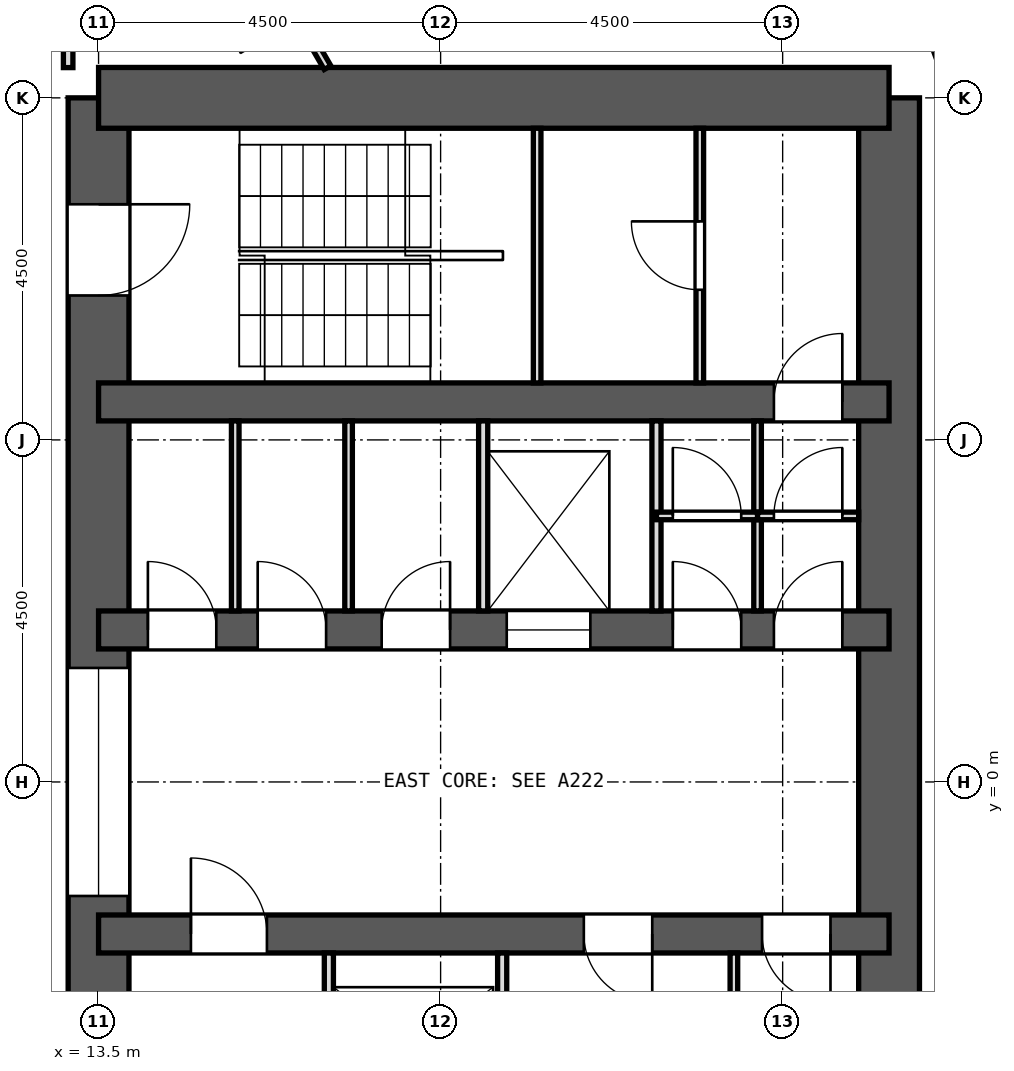
"""IFC4 building model, lengths in metres.
Left out: names, types, materials, properties, quantities, classifications, styles, units other than length and angle.
Written with IfcOpenShell. Run it as: python <this file> out.ifc"""

import sys

from ifc_helpers import new_model, si_unit, direction, frame, frame_2d, origin, place, context, subcontext, project, spatial, rectangle, extrude, element, fill, save


model = new_model("IFC4")
c1 = context("Model", 3, precision=1e-05, world=origin(), true_north=direction((0.0, 1.0)))
c2 = subcontext(c1, "Body", "Model", "MODEL_VIEW")
j1 = project(units=[si_unit("LENGTHUNIT", "METRE"), si_unit("PLANEANGLEUNIT", "RADIAN")], contexts=[c1])
p1 = place(None, origin())
s1 = spatial("IfcSite", under=j1, at=p1, CompositionType="ELEMENT")
p2 = place(p1, origin())
s2 = spatial("IfcBuilding", under=s1, at=p2, CompositionType="ELEMENT")
p3 = place(p2, frame((0.0, 0.0, 141.4)))
s3 = spatial("IfcBuildingStorey", under=s2, at=p3, CompositionType="ELEMENT", Elevation=141.4)
p4 = place(p3, frame((13.5, -9.0, 0.0), z_axis=(0.0, 0.0, 1.0), x_axis=(0.0, 1.0, 0.0)))
e1 = element("IfcWall", 1, at=p4, inside=s3, PredefinedType="SHEAR", context=c2, shape_type="SweptSolid", body=[
    extrude(rectangle(XDim=18.0, YDim=0.8, at=frame_2d((9.0, 0.0))), origin(), (0.0, 0.0, 1.0), 3.3),
])
p5 = place(p4, frame((15.4, 0.0, 0.0)))
e2 = element("IfcOpeningElement", 2, at=p5, cuts=e1, PredefinedType="OPENING", context=c2, shape_type="SweptSolid", body=[
    extrude(rectangle(XDim=1.2, YDim=2.1, at=frame_2d((0.6, 1.05))), frame((0.0, 0.412, 0.0), z_axis=(0.0, -1.0, 0.0), x_axis=(1.0, 0.0, 0.0)), (0.0, 0.0, 1.0), 0.824),
])
p6 = place(p4, frame((1.4, 0.0, 0.0)))
e3 = element("IfcOpeningElement", 3, at=p6, cuts=e1, PredefinedType="OPENING", context=c2, shape_type="SweptSolid", body=[
    extrude(rectangle(XDim=1.2, YDim=2.1, at=frame_2d((0.6, 1.05))), frame((0.0, 0.412, 0.0), z_axis=(0.0, -1.0, 0.0), x_axis=(1.0, 0.0, 0.0)), (0.0, 0.0, 1.0), 0.824),
])
p7 = place(p4, frame((7.5, 0.0, 0.0)))
e4 = element("IfcOpeningElement", 4, at=p7, cuts=e1, PredefinedType="OPENING", context=c2, shape_type="SweptSolid", body=[
    extrude(rectangle(XDim=3.0, YDim=2.4, at=frame_2d((1.5, 1.2))), frame((0.0, 0.412, 0.0), z_axis=(0.0, -1.0, 0.0), x_axis=(1.0, 0.0, 0.0)), (0.0, 0.0, 1.0), 0.824),
])
p8 = place(p3, frame((23.9, -9.0, 0.0), z_axis=(0.0, 0.0, 1.0), x_axis=(0.0, 1.0, 0.0)))
e5 = element("IfcWall", 5, at=p8, inside=s3, PredefinedType="SHEAR", context=c2, shape_type="SweptSolid", body=[
    extrude(rectangle(XDim=18.0, YDim=0.8, at=frame_2d((9.0, 0.0))), origin(), (0.0, 0.0, 1.0), 3.3),
])
p9 = place(p3, frame((13.5, 9.0, 0.0), z_axis=(0.0, 0.0, 1.0), x_axis=(1.0, 0.0, 0.0)))
e6 = element("IfcWall", 6, at=p9, inside=s3, PredefinedType="SHEAR", context=c2, shape_type="SweptSolid", body=[
    extrude(rectangle(XDim=10.4, YDim=0.8, at=frame_2d((5.2, 0.0))), origin(), (0.0, 0.0, 1.0), 3.3),
])
p10 = place(p3, frame((13.5, 5.0, 0.0), z_axis=(0.0, 0.0, 1.0), x_axis=(1.0, 0.0, 0.0)))
e7 = element("IfcWall", 7, at=p10, inside=s3, PredefinedType="SHEAR", context=c2, shape_type="SweptSolid", body=[
    extrude(rectangle(XDim=10.4, YDim=0.5, at=frame_2d((5.2, 0.0))), origin(), (0.0, 0.0, 1.0), 3.3),
])
p11 = place(p10, frame((8.885, 0.0, 0.0)))
e8 = element("IfcOpeningElement", 8, at=p11, cuts=e7, PredefinedType="OPENING", context=c2, shape_type="SweptSolid", body=[
    extrude(rectangle(XDim=0.9, YDim=2.1, at=frame_2d((0.45, 1.05))), frame((0.0, 0.262, 0.0), z_axis=(0.0, -1.0, 0.0), x_axis=(1.0, 0.0, 0.0)), (0.0, 0.0, 1.0), 0.524),
])
p12 = place(p3, frame((13.5, 2.0, 0.0), z_axis=(0.0, 0.0, 1.0), x_axis=(1.0, 0.0, 0.0)))
e9 = element("IfcWall", 9, at=p12, inside=s3, PredefinedType="SHEAR", context=c2, shape_type="SweptSolid", body=[
    extrude(rectangle(XDim=10.4, YDim=0.5, at=frame_2d((5.2, 0.0))), origin(), (0.0, 0.0, 1.0), 3.3),
])
p13 = place(p12, frame((5.37, 0.0, 0.0)))
e10 = element("IfcOpeningElement", 10, at=p13, cuts=e9, PredefinedType="OPENING", context=c2, shape_type="SweptSolid", body=[
    extrude(rectangle(XDim=1.1, YDim=2.1, at=frame_2d((0.55, 1.05))), frame((0.0, 0.262, 0.0), z_axis=(0.0, -1.0, 0.0), x_axis=(1.0, 0.0, 0.0)), (0.0, 0.0, 1.0), 0.524),
])
p14 = place(p12, frame((0.649, 0.0, 0.0)))
e11 = element("IfcOpeningElement", 11, at=p14, cuts=e9, PredefinedType="OPENING", context=c2, shape_type="SweptSolid", body=[
    extrude(rectangle(XDim=0.9, YDim=2.1, at=frame_2d((0.45, 1.05))), frame((0.0, 0.262, 0.0), z_axis=(0.0, -1.0, 0.0), x_axis=(1.0, 0.0, 0.0)), (0.0, 0.0, 1.0), 0.524),
])
p15 = place(p12, frame((2.094, 0.0, 0.0)))
e12 = element("IfcOpeningElement", 12, at=p15, cuts=e9, PredefinedType="OPENING", context=c2, shape_type="SweptSolid", body=[
    extrude(rectangle(XDim=0.9, YDim=2.1, at=frame_2d((0.45, 1.05))), frame((0.0, 0.262, 0.0), z_axis=(0.0, -1.0, 0.0), x_axis=(1.0, 0.0, 0.0)), (0.0, 0.0, 1.0), 0.524),
])
p16 = place(p12, frame((3.725, 0.0, 0.0)))
e13 = element("IfcOpeningElement", 13, at=p16, cuts=e9, PredefinedType="OPENING", context=c2, shape_type="SweptSolid", body=[
    extrude(rectangle(XDim=0.9, YDim=2.1, at=frame_2d((0.45, 1.05))), frame((0.0, 0.262, 0.0), z_axis=(0.0, -1.0, 0.0), x_axis=(1.0, 0.0, 0.0)), (0.0, 0.0, 1.0), 0.524),
])
p17 = place(p12, frame((7.555, 0.0, 0.0)))
e14 = element("IfcOpeningElement", 14, at=p17, cuts=e9, PredefinedType="OPENING", context=c2, shape_type="SweptSolid", body=[
    extrude(rectangle(XDim=0.9, YDim=2.1, at=frame_2d((0.45, 1.05))), frame((0.0, 0.262, 0.0), z_axis=(0.0, -1.0, 0.0), x_axis=(1.0, 0.0, 0.0)), (0.0, 0.0, 1.0), 0.524),
])
p18 = place(p12, frame((8.885, 0.0, 0.0)))
e15 = element("IfcOpeningElement", 15, at=p18, cuts=e9, PredefinedType="OPENING", context=c2, shape_type="SweptSolid", body=[
    extrude(rectangle(XDim=0.9, YDim=2.1, at=frame_2d((0.45, 1.05))), frame((0.0, 0.262, 0.0), z_axis=(0.0, -1.0, 0.0), x_axis=(1.0, 0.0, 0.0)), (0.0, 0.0, 1.0), 0.524),
])
p19 = place(p3, frame((13.5, -2.0, 0.0), z_axis=(0.0, 0.0, 1.0), x_axis=(1.0, 0.0, 0.0)))
e16 = element("IfcWall", 16, at=p19, inside=s3, PredefinedType="SHEAR", context=c2, shape_type="SweptSolid", body=[
    extrude(rectangle(XDim=10.4, YDim=0.5, at=frame_2d((5.2, 0.0))), origin(), (0.0, 0.0, 1.0), 3.3),
])
p20 = place(p19, frame((1.215, 0.0, 0.0)))
e17 = element("IfcOpeningElement", 17, at=p20, cuts=e16, PredefinedType="OPENING", context=c2, shape_type="SweptSolid", body=[
    extrude(rectangle(XDim=1.0, YDim=2.1, at=frame_2d((0.5, 1.05))), frame((0.0, 0.262, 0.0), z_axis=(0.0, -1.0, 0.0), x_axis=(1.0, 0.0, 0.0)), (0.0, 0.0, 1.0), 0.524),
])
p21 = place(p19, frame((6.384, 0.0, 0.0)))
e18 = element("IfcOpeningElement", 18, at=p21, cuts=e16, PredefinedType="OPENING", context=c2, shape_type="SweptSolid", body=[
    extrude(rectangle(XDim=0.9, YDim=2.1, at=frame_2d((0.45, 1.05))), frame((0.0, 0.262, 0.0), z_axis=(0.0, -1.0, 0.0), x_axis=(1.0, 0.0, 0.0)), (0.0, 0.0, 1.0), 0.524),
])
p22 = place(p19, frame((8.729, 0.0, 0.0)))
e19 = element("IfcOpeningElement", 19, at=p22, cuts=e16, PredefinedType="OPENING", context=c2, shape_type="SweptSolid", body=[
    extrude(rectangle(XDim=0.9, YDim=2.1, at=frame_2d((0.45, 1.05))), frame((0.0, 0.262, 0.0), z_axis=(0.0, -1.0, 0.0), x_axis=(1.0, 0.0, 0.0)), (0.0, 0.0, 1.0), 0.524),
])
p23 = place(p3, frame((25.617, 7.383, 0.0), z_axis=(0.0, 0.0, 1.0), x_axis=(-0.341990236633, 0.939703505393, 0.0)))
e20 = element("IfcWall", 20, at=p23, inside=s3, PredefinedType="SOLIDWALL", context=c2, shape_type="SweptSolid", body=[
    extrude(rectangle(XDim=3.648, YDim=0.6, at=frame_2d((1.824, 0.0))), origin(), (0.0, 0.0, 1.0), 2.8),
])
p24 = place(p3, frame((15.597, 10.983, 0.0), z_axis=(0.0, 0.0, 1.0), x_axis=(0.500084239528, -0.865976762607, 0.0)))
e21 = element("IfcWall", 21, at=p24, inside=s3, PredefinedType="PARTITIONING", context=c2, shape_type="SweptSolid", body=[
    extrude(rectangle(XDim=1.83, YDim=0.1, at=frame_2d((0.915, 0.0))), origin(), (0.0, 0.0, 1.0), 2.8),
])
p25 = place(p24, frame((0.19, 0.0, 0.0)))
e22 = element("IfcOpeningElement", 22, at=p25, cuts=e21, PredefinedType="OPENING", context=c2, shape_type="SweptSolid", body=[
    extrude(rectangle(XDim=0.9, YDim=2.1, at=frame_2d((0.45, 1.05))), frame((0.0, 0.062, 0.0), z_axis=(0.0, -1.0, 0.0), x_axis=(1.0, 0.0, 0.0)), (0.0, 0.0, 1.0), 0.124),
])
p26 = place(p3, frame((8.278, 8.278, 0.0), z_axis=(0.0, 0.0, 1.0), x_axis=(0.707106781187, 0.707106781187, 0.0)))
e23 = element("IfcWall", 23, at=p26, inside=s3, PredefinedType="PARTITIONING", context=c2, shape_type="SweptSolid", body=[
    extrude(rectangle(XDim=6.75, YDim=0.125, at=frame_2d((3.375, 0.0))), origin(), (0.0, 0.0, 1.0), 2.8),
])
p27 = place(p3, frame((13.1, 9.398, 0.0), z_axis=(0.0, 0.0, 1.0), x_axis=(0.0, 1.0, 0.0)))
e24 = element("IfcWall", 24, at=p27, inside=s3, PredefinedType="PARTITIONING", context=c2, shape_type="SweptSolid", body=[
    extrude(rectangle(XDim=3.639, YDim=0.125, at=frame_2d((1.819, 0.0))), origin(), (0.0, 0.0, 1.0), 2.8),
])
for number, where, z_axis, x_axis in (
    (25, (15.298, 2.25, 0.0), (0.0, 0.0, 1.0), (0.0, 1.0, 0.0)),
    (26, (16.789, 2.25, 0.0), (0.0, 0.0, 1.0), (0.0, 1.0, 0.0)),
):
    element("IfcWall", number, at=place(p3, frame(where, z_axis=z_axis, x_axis=x_axis)), inside=s3, PredefinedType="PARTITIONING", context=c2, shape_type="SweptSolid", body=[
        extrude(rectangle(XDim=2.5, YDim=0.1, at=frame_2d((1.25, 0.0))), origin(), (0.0, 0.0, 1.0), 2.8),
    ])
for number, where, z_axis, x_axis in (
    (27, (18.56, 2.25, 0.0), (0.0, 0.0, 1.0), (0.0, 1.0, 0.0)),
    (28, (20.84, 2.25, 0.0), (0.0, 0.0, 1.0), (0.0, 1.0, 0.0)),
):
    element("IfcWall", number, at=place(p3, frame(where, z_axis=z_axis, x_axis=x_axis)), inside=s3, PredefinedType="PARTITIONING", context=c2, shape_type="SweptSolid", body=[
        extrude(rectangle(XDim=2.5, YDim=0.12, at=frame_2d((1.25, 0.0))), origin(), (0.0, 0.0, 1.0), 2.8),
    ])
p28 = place(p3, frame((22.17, 2.25, 0.0), z_axis=(0.0, 0.0, 1.0), x_axis=(0.0, 1.0, 0.0)))
e29 = element("IfcWall", 29, at=p28, inside=s3, PredefinedType="PARTITIONING", context=c2, shape_type="SweptSolid", body=[
    extrude(rectangle(XDim=2.5, YDim=0.1, at=frame_2d((1.25, 0.0))), origin(), (0.0, 0.0, 1.0), 2.8),
])
p29 = place(p3, frame((16.53, -4.75, 0.0), z_axis=(0.0, 0.0, 1.0), x_axis=(0.0, 1.0, 0.0)))
e30 = element("IfcWall", 30, at=p29, inside=s3, PredefinedType="PARTITIONING", context=c2, shape_type="SweptSolid", body=[
    extrude(rectangle(XDim=2.5, YDim=0.12, at=frame_2d((1.25, 0.0))), origin(), (0.0, 0.0, 1.0), 2.8),
])
p30 = place(p29, frame((0.7, 0.0, 0.0)))
e31 = element("IfcOpeningElement", 31, at=p30, cuts=e30, PredefinedType="OPENING", context=c2, shape_type="SweptSolid", body=[
    extrude(rectangle(XDim=1.1, YDim=2.1, at=frame_2d((0.55, 1.05))), frame((0.0, 0.072, 0.0), z_axis=(0.0, -1.0, 0.0), x_axis=(1.0, 0.0, 0.0)), (0.0, 0.0, 1.0), 0.144),
])
p31 = place(p3, frame((18.81, -4.75, 0.0), z_axis=(0.0, 0.0, 1.0), x_axis=(0.0, 1.0, 0.0)))
e32 = element("IfcWall", 32, at=p31, inside=s3, PredefinedType="PARTITIONING", context=c2, shape_type="SweptSolid", body=[
    extrude(rectangle(XDim=2.5, YDim=0.12, at=frame_2d((1.25, 0.0))), origin(), (0.0, 0.0, 1.0), 2.8),
])
p32 = place(p3, frame((21.858, -4.75, 0.0), z_axis=(0.0, 0.0, 1.0), x_axis=(0.0, 1.0, 0.0)))
e33 = element("IfcWall", 33, at=p32, inside=s3, PredefinedType="PARTITIONING", context=c2, shape_type="SweptSolid", body=[
    extrude(rectangle(XDim=2.5, YDim=0.1, at=frame_2d((1.25, 0.0))), origin(), (0.0, 0.0, 1.0), 2.8),
])
p33 = place(p3, frame((20.84, 3.5, 0.0), z_axis=(0.0, 0.0, 1.0), x_axis=(1.0, 0.0, 0.0)))
e34 = element("IfcWall", 34, at=p33, inside=s3, PredefinedType="PARTITIONING", context=c2, shape_type="SweptSolid", body=[
    extrude(rectangle(XDim=1.33, YDim=0.1, at=frame_2d((0.665, 0.0))), origin(), (0.0, 0.0, 1.0), 2.8),
])
p34 = place(p33, frame((0.215, 0.0, 0.0)))
e35 = element("IfcOpeningElement", 35, at=p34, cuts=e34, PredefinedType="OPENING", context=c2, shape_type="SweptSolid", body=[
    extrude(rectangle(XDim=0.9, YDim=2.1, at=frame_2d((0.45, 1.05))), frame((0.0, 0.062, 0.0), z_axis=(0.0, -1.0, 0.0), x_axis=(1.0, 0.0, 0.0)), (0.0, 0.0, 1.0), 0.124),
])
p35 = place(p3, frame((22.17, 3.5, 0.0), z_axis=(0.0, 0.0, 1.0), x_axis=(1.0, 0.0, 0.0)))
e36 = element("IfcWall", 36, at=p35, inside=s3, PredefinedType="PARTITIONING", context=c2, shape_type="SweptSolid", body=[
    extrude(rectangle(XDim=1.33, YDim=0.1, at=frame_2d((0.665, 0.0))), origin(), (0.0, 0.0, 1.0), 2.8),
])
p36 = place(p35, frame((0.215, 0.0, 0.0)))
e37 = element("IfcOpeningElement", 37, at=p36, cuts=e36, PredefinedType="OPENING", context=c2, shape_type="SweptSolid", body=[
    extrude(rectangle(XDim=0.9, YDim=2.1, at=frame_2d((0.45, 1.05))), frame((0.0, 0.062, 0.0), z_axis=(0.0, -1.0, 0.0), x_axis=(1.0, 0.0, 0.0)), (0.0, 0.0, 1.0), 0.124),
])
p37 = place(p3, frame((19.27, 5.25, 0.0), z_axis=(0.0, 0.0, 1.0), x_axis=(0.0, 1.0, 0.0)))
e38 = element("IfcWall", 38, at=p37, inside=s3, PredefinedType="PARTITIONING", context=c2, shape_type="SweptSolid", body=[
    extrude(rectangle(XDim=3.35, YDim=0.1, at=frame_2d((1.675, 0.0))), origin(), (0.0, 0.0, 1.0), 2.8),
])
p38 = place(p3, frame((21.41, 5.25, 0.0), z_axis=(0.0, 0.0, 1.0), x_axis=(0.0, 1.0, 0.0)))
e39 = element("IfcWall", 39, at=p38, inside=s3, PredefinedType="PARTITIONING", context=c2, shape_type="SweptSolid", body=[
    extrude(rectangle(XDim=3.35, YDim=0.1, at=frame_2d((1.675, 0.0))), origin(), (0.0, 0.0, 1.0), 2.8),
])
p39 = place(p38, frame((1.225, 0.0, 0.0)))
e40 = element("IfcOpeningElement", 40, at=p39, cuts=e39, PredefinedType="OPENING", context=c2, shape_type="SweptSolid", body=[
    extrude(rectangle(XDim=0.9, YDim=2.1, at=frame_2d((0.45, 1.05))), frame((0.0, 0.062, 0.0), z_axis=(0.0, -1.0, 0.0), x_axis=(1.0, 0.0, 0.0)), (0.0, 0.0, 1.0), 0.124),
])
p40 = place(p13, origin())
e41 = element("IfcDoor", 41, at=p40, inside=s3, OperationType="DOUBLE_DOOR_SLIDING", PredefinedType="DOOR", context=c2, shape_type="SweptSolid", body=[
    extrude(rectangle(XDim=1.1, YDim=2.1, at=frame_2d((0.55, 1.05))), frame((0.0, 0.025, 0.0), z_axis=(0.0, -1.0, 0.0), x_axis=(1.0, 0.0, 0.0)), (0.0, 0.0, 1.0), 0.05),
])
fill(e10, e41)
p41 = place(p14, origin())
e42 = element("IfcDoor", 42, at=p41, inside=s3, OperationType="SINGLE_SWING_LEFT", PredefinedType="DOOR", context=c2, shape_type="SweptSolid", body=[
    extrude(rectangle(XDim=0.9, YDim=2.1, at=frame_2d((0.45, 1.05))), frame((0.0, 0.025, 0.0), z_axis=(0.0, -1.0, 0.0), x_axis=(1.0, 0.0, 0.0)), (0.0, 0.0, 1.0), 0.05),
])
fill(e11, e42)
p42 = place(p15, origin())
e43 = element("IfcDoor", 43, at=p42, inside=s3, OperationType="SINGLE_SWING_LEFT", PredefinedType="DOOR", context=c2, shape_type="SweptSolid", body=[
    extrude(rectangle(XDim=0.9, YDim=2.1, at=frame_2d((0.45, 1.05))), frame((0.0, 0.025, 0.0), z_axis=(0.0, -1.0, 0.0), x_axis=(1.0, 0.0, 0.0)), (0.0, 0.0, 1.0), 0.05),
])
fill(e12, e43)
p43 = place(p16, origin())
e44 = element("IfcDoor", 44, at=p43, inside=s3, OperationType="SINGLE_SWING_RIGHT", PredefinedType="DOOR", context=c2, shape_type="SweptSolid", body=[
    extrude(rectangle(XDim=0.9, YDim=2.1, at=frame_2d((0.45, 1.05))), frame((0.0, 0.025, 0.0), z_axis=(0.0, -1.0, 0.0), x_axis=(1.0, 0.0, 0.0)), (0.0, 0.0, 1.0), 0.05),
])
fill(e13, e44)
p44 = place(p17, origin())
e45 = element("IfcDoor", 45, at=p44, inside=s3, OperationType="SINGLE_SWING_LEFT", PredefinedType="DOOR", context=c2, shape_type="SweptSolid", body=[
    extrude(rectangle(XDim=0.9, YDim=2.1, at=frame_2d((0.45, 1.05))), frame((0.0, 0.025, 0.0), z_axis=(0.0, -1.0, 0.0), x_axis=(1.0, 0.0, 0.0)), (0.0, 0.0, 1.0), 0.05),
])
fill(e14, e45)
p45 = place(p18, origin())
e46 = element("IfcDoor", 46, at=p45, inside=s3, OperationType="SINGLE_SWING_RIGHT", PredefinedType="DOOR", context=c2, shape_type="SweptSolid", body=[
    extrude(rectangle(XDim=0.9, YDim=2.1, at=frame_2d((0.45, 1.05))), frame((0.0, 0.025, 0.0), z_axis=(0.0, -1.0, 0.0), x_axis=(1.0, 0.0, 0.0)), (0.0, 0.0, 1.0), 0.05),
])
fill(e15, e46)
p46 = place(p20, origin())
e47 = element("IfcDoor", 47, at=p46, inside=s3, OperationType="SINGLE_SWING_LEFT", PredefinedType="DOOR", context=c2, shape_type="SweptSolid", body=[
    extrude(rectangle(XDim=1.0, YDim=2.1, at=frame_2d((0.5, 1.05))), frame((0.0, 0.025, 0.0), z_axis=(0.0, -1.0, 0.0), x_axis=(1.0, 0.0, 0.0)), (0.0, 0.0, 1.0), 0.05),
])
fill(e17, e47)
p47 = place(p21, frame((0.9, 0.0, 0.0), z_axis=(0.0, 0.0, 1.0), x_axis=(-1.0, 0.0, 0.0)))
e48 = element("IfcDoor", 48, at=p47, inside=s3, OperationType="SINGLE_SWING_LEFT", PredefinedType="DOOR", context=c2, shape_type="SweptSolid", body=[
    extrude(rectangle(XDim=0.9, YDim=2.1, at=frame_2d((0.45, 1.05))), frame((0.0, 0.025, 0.0), z_axis=(0.0, -1.0, 0.0), x_axis=(1.0, 0.0, 0.0)), (0.0, 0.0, 1.0), 0.05),
])
fill(e18, e48)
p48 = place(p22, frame((0.9, 0.0, 0.0), z_axis=(0.0, 0.0, 1.0), x_axis=(-1.0, 0.0, 0.0)))
e49 = element("IfcDoor", 49, at=p48, inside=s3, OperationType="SINGLE_SWING_LEFT", PredefinedType="DOOR", context=c2, shape_type="SweptSolid", body=[
    extrude(rectangle(XDim=0.9, YDim=2.1, at=frame_2d((0.45, 1.05))), frame((0.0, 0.025, 0.0), z_axis=(0.0, -1.0, 0.0), x_axis=(1.0, 0.0, 0.0)), (0.0, 0.0, 1.0), 0.05),
])
fill(e19, e49)
p49 = place(p36, origin())
e50 = element("IfcDoor", 50, at=p49, inside=s3, OperationType="SINGLE_SWING_RIGHT", PredefinedType="DOOR", context=c2, shape_type="SweptSolid", body=[
    extrude(rectangle(XDim=0.9, YDim=2.1, at=frame_2d((0.45, 1.05))), frame((0.0, 0.025, 0.0), z_axis=(0.0, -1.0, 0.0), x_axis=(1.0, 0.0, 0.0)), (0.0, 0.0, 1.0), 0.05),
])
fill(e37, e50)
p50 = place(p34, origin())
e51 = element("IfcDoor", 51, at=p50, inside=s3, OperationType="SINGLE_SWING_LEFT", PredefinedType="DOOR", context=c2, shape_type="SweptSolid", body=[
    extrude(rectangle(XDim=0.9, YDim=2.1, at=frame_2d((0.45, 1.05))), frame((0.0, 0.025, 0.0), z_axis=(0.0, -1.0, 0.0), x_axis=(1.0, 0.0, 0.0)), (0.0, 0.0, 1.0), 0.05),
])
fill(e35, e51)
p51 = place(p39, origin())
e52 = element("IfcDoor", 52, at=p51, inside=s3, OperationType="SINGLE_SWING_RIGHT", PredefinedType="DOOR", context=c2, shape_type="SweptSolid", body=[
    extrude(rectangle(XDim=0.9, YDim=2.1, at=frame_2d((0.45, 1.05))), frame((0.0, 0.025, 0.0), z_axis=(0.0, -1.0, 0.0), x_axis=(1.0, 0.0, 0.0)), (0.0, 0.0, 1.0), 0.05),
])
fill(e40, e52)
p52 = place(p11, origin())
e53 = element("IfcDoor", 53, at=p52, inside=s3, OperationType="SINGLE_SWING_RIGHT", PredefinedType="DOOR", context=c2, shape_type="SweptSolid", body=[
    extrude(rectangle(XDim=0.9, YDim=2.1, at=frame_2d((0.45, 1.05))), frame((0.0, 0.025, 0.0), z_axis=(0.0, -1.0, 0.0), x_axis=(1.0, 0.0, 0.0)), (0.0, 0.0, 1.0), 0.05),
])
fill(e8, e53)
p53 = place(p5, frame((1.2, 0.0, 0.0), z_axis=(0.0, 0.0, 1.0), x_axis=(-1.0, 0.0, 0.0)))
e54 = element("IfcDoor", 54, at=p53, inside=s3, OperationType="SINGLE_SWING_LEFT", PredefinedType="DOOR", context=c2, shape_type="SweptSolid", body=[
    extrude(rectangle(XDim=1.2, YDim=2.1, at=frame_2d((0.6, 1.05))), frame((0.0, 0.025, 0.0), z_axis=(0.0, -1.0, 0.0), x_axis=(1.0, 0.0, 0.0)), (0.0, 0.0, 1.0), 0.05),
])
fill(e2, e54)
p54 = place(p7, origin())
e55 = element("IfcDoor", 55, at=p54, inside=s3, OperationType="DOUBLE_DOOR_SLIDING", PredefinedType="DOOR", context=c2, shape_type="SweptSolid", body=[
    extrude(rectangle(XDim=3.0, YDim=2.4, at=frame_2d((1.5, 1.2))), frame((0.0, 0.025, 0.0), z_axis=(0.0, -1.0, 0.0), x_axis=(1.0, 0.0, 0.0)), (0.0, 0.0, 1.0), 0.05),
])
fill(e4, e55)
save(model, sys.argv[1])
